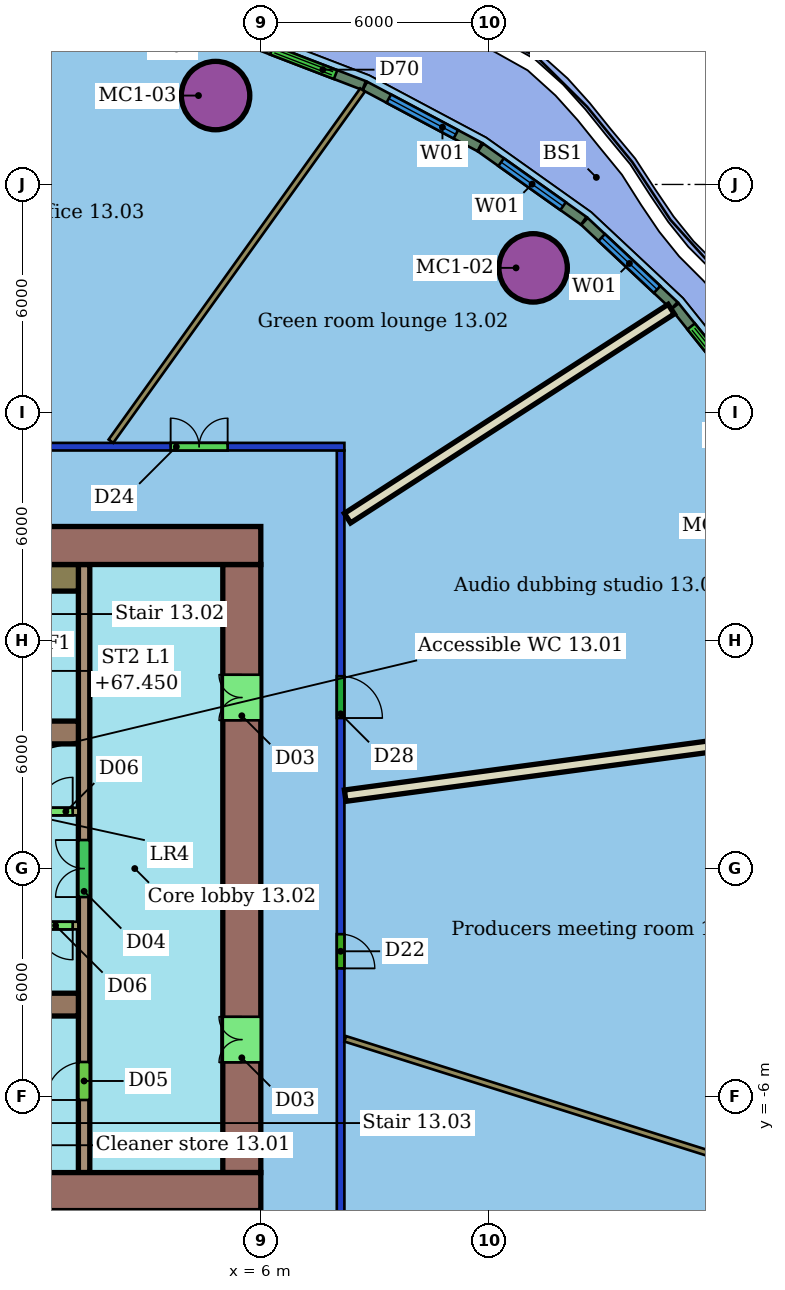
"""IFC4 building model, lengths in metres.
Left out: names, types, materials, properties, quantities, classifications, styles, units other than length and angle.
Written with IfcOpenShell. Run it as: python <this file> out.ifc"""

import sys

from ifc_helpers import new_model, si_unit, direction, frame, frame_2d, origin, origin_2d, place, context, subcontext, project, spatial, rectangle, hollow_circle, extrude, element, fill, save


model = new_model("IFC4")
c1 = context("Model", 3, precision=1e-05, world=origin(), true_north=direction((0.0, 1.0)))
c2 = subcontext(c1, "Body", "Model", "MODEL_VIEW")
j1 = project(units=[si_unit("LENGTHUNIT", "METRE"), si_unit("PLANEANGLEUNIT", "RADIAN")], contexts=[c1])
p1 = place(None, origin())
s1 = spatial("IfcSite", under=j1, at=p1, CompositionType="ELEMENT")
p2 = place(p1, origin())
s2 = spatial("IfcBuilding", under=s1, at=p2, CompositionType="ELEMENT")
p3 = place(p2, frame((0.0, 0.0, 65.6)))
s3 = spatial("IfcBuildingStorey", under=s2, at=p3, CompositionType="ELEMENT", Elevation=65.6)
for number, where, z_axis, x_axis in (
    (1, (13.166, 15.805, 0.0), (0.0, 0.0, 1.0), (1.0, 0.0, 0.0)),
    (2, (4.81, 20.339, 0.0), (0.0, 0.0, 1.0), (1.0, 0.0, 0.0)),
):
    element("IfcColumn", number, at=place(p3, frame(where, z_axis=z_axis, x_axis=x_axis)), inside=s3, PredefinedType="COLUMN", context=c2, shape_type="SweptSolid", body=[
        extrude(hollow_circle(Radius=0.9, WallThickness=0.06, at=origin_2d()), origin(), (0.0, 0.0, 1.0), 3.55),
    ])
p4 = place(p3, frame((-20.2, 11.1, 0.0), z_axis=(0.0, 0.0, 1.0), x_axis=(1.0, 0.0, 0.0)))
e3 = element("IfcWall", 3, at=p4, inside=s3, PredefinedType="PARTITIONING", context=c2, shape_type="SweptSolid", body=[
    extrude(rectangle(XDim=28.4, YDim=0.2, at=frame_2d((14.2, 0.0))), origin(), (0.0, 0.0, 1.0), 2.85),
])
p5 = place(p4, frame((23.828, 0.0, 0.0)))
e4 = element("IfcOpeningElement", 4, at=p5, cuts=e3, PredefinedType="OPENING", context=c2, shape_type="SweptSolid", body=[
    extrude(rectangle(XDim=1.5, YDim=2.1, at=frame_2d((0.75, 1.05))), frame((0.0, 0.11, 0.0), z_axis=(0.0, -1.0, 0.0), x_axis=(1.0, 0.0, 0.0)), (0.0, 0.0, 1.0), 0.22),
])
p6 = place(p4, frame((19.006, 0.0, 0.0)))
e5 = element("IfcOpeningElement", 5, at=p6, cuts=e3, PredefinedType="OPENING", context=c2, shape_type="SweptSolid", body=[
    extrude(rectangle(XDim=1.0, YDim=2.1, at=frame_2d((0.5, 1.05))), frame((0.0, 0.11, 0.0), z_axis=(0.0, -1.0, 0.0), x_axis=(1.0, 0.0, 0.0)), (0.0, 0.0, 1.0), 0.22),
])
p7 = place(p4, frame((10.323, 0.0, 0.0)))
e6 = element("IfcOpeningElement", 6, at=p7, cuts=e3, PredefinedType="OPENING", context=c2, shape_type="SweptSolid", body=[
    extrude(rectangle(XDim=1.2, YDim=2.1, at=frame_2d((0.6, 1.05))), frame((0.0, 0.11, 0.0), z_axis=(0.0, -1.0, 0.0), x_axis=(1.0, 0.0, 0.0)), (0.0, 0.0, 1.0), 0.22),
])
p8 = place(p4, frame((6.36, 0.0, 0.0)))
e7 = element("IfcOpeningElement", 7, at=p8, cuts=e3, PredefinedType="OPENING", context=c2, shape_type="SweptSolid", body=[
    extrude(rectangle(XDim=1.0, YDim=2.1, at=frame_2d((0.5, 1.05))), frame((0.0, 0.11, 0.0), z_axis=(0.0, -1.0, 0.0), x_axis=(1.0, 0.0, 0.0)), (0.0, 0.0, 1.0), 0.22),
])
p9 = place(p3, frame((8.1, 11.0, 0.0), z_axis=(0.0, 0.0, 1.0), x_axis=(0.0, -1.0, 0.0)))
e8 = element("IfcWall", 8, at=p9, inside=s3, PredefinedType="PARTITIONING", context=c2, shape_type="SweptSolid", body=[
    extrude(rectangle(XDim=22.0, YDim=0.2, at=frame_2d((11.0, 0.0))), origin(), (0.0, 0.0, 1.0), 2.85),
])
p10 = place(p9, frame((5.939, 0.0, 0.0)))
e9 = element("IfcOpeningElement", 9, at=p10, cuts=e8, PredefinedType="OPENING", context=c2, shape_type="SweptSolid", body=[
    extrude(rectangle(XDim=1.1, YDim=2.1, at=frame_2d((0.55, 1.05))), frame((0.0, 0.11, 0.0), z_axis=(0.0, -1.0, 0.0), x_axis=(1.0, 0.0, 0.0)), (0.0, 0.0, 1.0), 0.22),
])
p11 = place(p9, frame((12.727, 0.0, 0.0)))
e10 = element("IfcOpeningElement", 10, at=p11, cuts=e8, PredefinedType="OPENING", context=c2, shape_type="SweptSolid", body=[
    extrude(rectangle(XDim=0.9, YDim=2.1, at=frame_2d((0.45, 1.05))), frame((0.0, 0.11, 0.0), z_axis=(0.0, -1.0, 0.0), x_axis=(1.0, 0.0, 0.0)), (0.0, 0.0, 1.0), 0.22),
])
p12 = place(p3, frame((22.084, 3.787, 0.0), z_axis=(0.0, 0.0, 1.0), x_axis=(-0.991028950032, -0.13364737258, 0.0)))
e11 = element("IfcWall", 11, at=p12, inside=s3, PredefinedType="PARTITIONING", context=c2, shape_type="SweptSolid", body=[
    extrude(rectangle(XDim=13.989, YDim=0.3, at=frame_2d((6.995, 0.0))), origin(), (0.0, 0.0, 1.0), 3.55),
])
p13 = place(p3, frame((16.8, 14.719, 0.0), z_axis=(0.0, 0.0, 1.0), x_axis=(-0.840135613628, -0.542376392106, 0.0)))
e12 = element("IfcWall", 12, at=p13, inside=s3, PredefinedType="PARTITIONING", context=c2, shape_type="SweptSolid", body=[
    extrude(rectangle(XDim=10.139, YDim=0.3, at=frame_2d((5.07, 0.0))), origin(), (0.0, 0.0, 1.0), 3.55),
])
p14 = place(p3, frame((8.678, 20.485, 0.0), z_axis=(0.0, 0.0, 1.0), x_axis=(-0.582440193454, -0.812873557849, 0.0)))
e13 = element("IfcWall", 13, at=p14, inside=s3, PredefinedType="PARTITIONING", context=c2, shape_type="SweptSolid", body=[
    extrude(rectangle(XDim=11.368, YDim=0.15, at=frame_2d((5.684, 0.0))), origin(), (0.0, 0.0, 1.0), 3.55),
])
p15 = place(p3, frame((19.884, -8.154, 0.0), z_axis=(0.0, 0.0, 1.0), x_axis=(-0.953792780191, 0.300465193417, 0.0)))
e14 = element("IfcWall", 14, at=p15, inside=s3, PredefinedType="PARTITIONING", context=c2, shape_type="SweptSolid", body=[
    extrude(rectangle(XDim=12.226, YDim=0.15, at=frame_2d((6.113, 0.0))), origin(), (0.0, 0.0, 1.0), 3.55),
])
p16 = place(p3, frame((18.874, 12.331, 0.0), z_axis=(0.0, 0.0, 1.0), x_axis=(-0.625543346061, 0.780189414308, 0.0)))
e15 = element("IfcWall", 15, at=p16, inside=s3, PredefinedType="SOLIDWALL", context=c2, shape_type="SweptSolid", body=[
    extrude(rectangle(XDim=3.157, YDim=0.25, at=frame_2d((1.579, 0.0))), origin(), (0.0, 0.0, 1.0), 3.15),
])
p17 = place(p16, frame((0.679, 0.0, 0.0)))
e16 = element("IfcOpeningElement", 16, at=p17, cuts=e15, PredefinedType="OPENING", context=c2, shape_type="SweptSolid", body=[
    extrude(rectangle(XDim=1.8, YDim=2.4, at=frame_2d((0.9, 1.2))), frame((0.0, 0.135, 0.0), z_axis=(0.0, -1.0, 0.0), x_axis=(1.0, 0.0, 0.0)), (0.0, 0.0, 1.0), 0.27),
])
p18 = place(p3, frame((16.882, 14.813, 0.0), z_axis=(0.0, 0.0, 1.0), x_axis=(-0.729856637525, 0.68360024039, 0.0)))
e17 = element("IfcWall", 17, at=p18, inside=s3, PredefinedType="SOLIDWALL", context=c2, shape_type="SweptSolid", body=[
    extrude(rectangle(XDim=3.241, YDim=0.25, at=frame_2d((1.62, 0.0))), origin(), (0.0, 0.0, 1.0), 3.15),
])
p19 = place(p18, frame((0.62, 0.0, 0.8)))
e18 = element("IfcOpeningElement", 18, at=p19, cuts=e17, PredefinedType="OPENING", context=c2, shape_type="SweptSolid", body=[
    extrude(rectangle(XDim=2.0, YDim=2.2, at=frame_2d((1.0, 1.1))), frame((0.0, 0.135, 0.0), z_axis=(0.0, -1.0, 0.0), x_axis=(1.0, 0.0, 0.0)), (0.0, 0.0, 1.0), 0.27),
])
p20 = place(p3, frame((14.497, 17.044, 0.0), z_axis=(0.0, 0.0, 1.0), x_axis=(-0.815374335275, 0.578934101064, 0.0)))
e19 = element("IfcWall", 19, at=p20, inside=s3, PredefinedType="SOLIDWALL", context=c2, shape_type="SweptSolid", body=[
    extrude(rectangle(XDim=3.331, YDim=0.25, at=frame_2d((1.666, 0.0))), origin(), (0.0, 0.0, 1.0), 3.15),
])
p21 = place(p20, frame((0.666, 0.0, 0.8)))
e20 = element("IfcOpeningElement", 20, at=p21, cuts=e19, PredefinedType="OPENING", context=c2, shape_type="SweptSolid", body=[
    extrude(rectangle(XDim=2.0, YDim=2.2, at=frame_2d((1.0, 1.1))), frame((0.0, 0.135, 0.0), z_axis=(0.0, -1.0, 0.0), x_axis=(1.0, 0.0, 0.0)), (0.0, 0.0, 1.0), 0.27),
])
p22 = place(p3, frame((11.761, 18.985, 0.0), z_axis=(0.0, 0.0, 1.0), x_axis=(-0.882781118704, 0.469784521308, 0.0)))
e21 = element("IfcWall", 21, at=p22, inside=s3, PredefinedType="SOLIDWALL", context=c2, shape_type="SweptSolid", body=[
    extrude(rectangle(XDim=3.422, YDim=0.25, at=frame_2d((1.711, 0.0))), origin(), (0.0, 0.0, 1.0), 3.15),
])
p23 = place(p22, frame((0.711, 0.0, 0.8)))
e22 = element("IfcOpeningElement", 22, at=p23, cuts=e21, PredefinedType="OPENING", context=c2, shape_type="SweptSolid", body=[
    extrude(rectangle(XDim=2.0, YDim=2.2, at=frame_2d((1.0, 1.1))), frame((0.0, 0.135, 0.0), z_axis=(0.0, -1.0, 0.0), x_axis=(1.0, 0.0, 0.0)), (0.0, 0.0, 1.0), 0.27),
])
p24 = place(p3, frame((8.719, 20.603, 0.0), z_axis=(0.0, 0.0, 1.0), x_axis=(-0.933440649203, 0.358731869808, 0.0)))
e23 = element("IfcWall", 23, at=p24, inside=s3, PredefinedType="SOLIDWALL", context=c2, shape_type="SweptSolid", body=[
    extrude(rectangle(XDim=3.508, YDim=0.25, at=frame_2d((1.754, 0.0))), origin(), (0.0, 0.0, 1.0), 3.15),
])
p25 = place(p24, frame((0.804, 0.0, 0.0)))
e24 = element("IfcOpeningElement", 24, at=p25, cuts=e23, PredefinedType="OPENING", context=c2, shape_type="SweptSolid", body=[
    extrude(rectangle(XDim=1.8, YDim=2.4, at=frame_2d((0.9, 1.2))), frame((0.0, 0.135, 0.0), z_axis=(0.0, -1.0, 0.0), x_axis=(1.0, 0.0, 0.0)), (0.0, 0.0, 1.0), 0.27),
])
p26 = place(p3, frame((6.0, 8.5, 0.0), z_axis=(0.0, 0.0, 1.0), x_axis=(-1.0, 0.0, 0.0)))
e25 = element("IfcWall", 25, at=p26, inside=s3, PredefinedType="SHEAR", context=c2, shape_type="SweptSolid", body=[
    extrude(rectangle(XDim=12.0, YDim=1.0, at=frame_2d((6.0, 0.0))), origin(), (0.0, 0.0, 1.0), 3.4),
])
p27 = place(p26, frame((5.6, 0.0, 0.0)))
e26 = element("IfcOpeningElement", 26, at=p27, cuts=e25, PredefinedType="OPENING", context=c2, shape_type="SweptSolid", body=[
    extrude(rectangle(XDim=1.2, YDim=2.1, at=frame_2d((0.6, 1.05))), frame((0.0, 0.51, 0.0), z_axis=(0.0, -1.0, 0.0), x_axis=(1.0, 0.0, 0.0)), (0.0, 0.0, 1.0), 1.02),
])
p28 = place(p3, frame((-18.0, -8.5, 0.0), z_axis=(0.0, 0.0, 1.0), x_axis=(1.0, 0.0, 0.0)))
e27 = element("IfcWall", 27, at=p28, inside=s3, PredefinedType="SHEAR", context=c2, shape_type="SweptSolid", body=[
    extrude(rectangle(XDim=24.0, YDim=1.0, at=frame_2d((12.0, 0.0))), origin(), (0.0, 0.0, 1.0), 3.4),
])
p29 = place(p28, frame((6.0, 0.0, 0.0)))
e28 = element("IfcOpeningElement", 28, at=p29, cuts=e27, PredefinedType="OPENING", context=c2, shape_type="SweptSolid", body=[
    extrude(rectangle(XDim=1.2, YDim=2.1, at=frame_2d((0.6, 1.05))), frame((0.0, 0.51, 0.0), z_axis=(0.0, -1.0, 0.0), x_axis=(1.0, 0.0, 0.0)), (0.0, 0.0, 1.0), 1.02),
])
p30 = place(p3, frame((5.5, -8.0, 0.0), z_axis=(0.0, 0.0, 1.0), x_axis=(0.0, 1.0, 0.0)))
e29 = element("IfcWall", 29, at=p30, inside=s3, PredefinedType="SHEAR", context=c2, shape_type="SweptSolid", body=[
    extrude(rectangle(XDim=16.0, YDim=1.0, at=frame_2d((8.0, 0.0))), origin(), (0.0, 0.0, 1.0), 3.4),
])
p31 = place(p30, frame((2.9, 0.0, 0.0)))
e30 = element("IfcOpeningElement", 30, at=p31, cuts=e29, PredefinedType="OPENING", context=c2, shape_type="SweptSolid", body=[
    extrude(rectangle(XDim=1.2, YDim=2.1, at=frame_2d((0.6, 1.05))), frame((0.0, 0.51, 0.0), z_axis=(0.0, -1.0, 0.0), x_axis=(1.0, 0.0, 0.0)), (0.0, 0.0, 1.0), 1.02),
])
p32 = place(p30, frame((11.9, 0.0, 0.0)))
e31 = element("IfcOpeningElement", 31, at=p32, cuts=e29, PredefinedType="OPENING", context=c2, shape_type="SweptSolid", body=[
    extrude(rectangle(XDim=1.2, YDim=2.1, at=frame_2d((0.6, 1.05))), frame((0.0, 0.51, 0.0), z_axis=(0.0, -1.0, 0.0), x_axis=(1.0, 0.0, 0.0)), (0.0, 0.0, 1.0), 1.02),
])
for number, where, z_axis, x_axis in (
    (32, (-6.0, 3.58, 0.0), (0.0, 0.0, 1.0), (1.0, 0.0, 0.0)),
    (33, (-6.0, -3.58, 0.0), (0.0, 0.0, 1.0), (1.0, 0.0, 0.0)),
):
    element("IfcWall", number, at=place(p3, frame(where, z_axis=z_axis, x_axis=x_axis)), inside=s3, PredefinedType="SHEAR", context=c2, shape_type="SweptSolid", body=[
        extrude(rectangle(XDim=7.2, YDim=0.6, at=frame_2d((3.6, 0.0))), origin(), (0.0, 0.0, 1.0), 3.4),
    ])
p33 = place(p3, frame((1.35, -8.0, 0.0), z_axis=(0.0, 0.0, 1.0), x_axis=(0.0, 1.0, 0.0)))
e34 = element("IfcWall", 34, at=p33, inside=s3, PredefinedType="SHEAR", context=c2, shape_type="SweptSolid", body=[
    extrude(rectangle(XDim=16.0, YDim=0.3, at=frame_2d((8.0, 0.0))), origin(), (0.0, 0.0, 1.0), 3.4),
])
p34 = place(p33, frame((1.91, 0.0, 0.0)))
e35 = element("IfcOpeningElement", 35, at=p34, cuts=e34, PredefinedType="OPENING", context=c2, shape_type="SweptSolid", body=[
    extrude(rectangle(XDim=1.0, YDim=2.1, at=frame_2d((0.5, 1.05))), frame((0.0, 0.16, 0.0), z_axis=(0.0, -1.0, 0.0), x_axis=(1.0, 0.0, 0.0)), (0.0, 0.0, 1.0), 0.32),
])
p35 = place(p33, frame((7.25, 0.0, 0.0)))
e36 = element("IfcOpeningElement", 36, at=p35, cuts=e34, PredefinedType="OPENING", context=c2, shape_type="SweptSolid", body=[
    extrude(rectangle(XDim=1.5, YDim=2.1, at=frame_2d((0.75, 1.05))), frame((0.0, 0.16, 0.0), z_axis=(0.0, -1.0, 0.0), x_axis=(1.0, 0.0, 0.0)), (0.0, 0.0, 1.0), 0.32),
])
p36 = place(p3, frame((-13.2, 1.5, 0.0), z_axis=(0.0, 0.0, 1.0), x_axis=(1.0, 0.0, 0.0)))
e37 = element("IfcWall", 37, at=p36, inside=s3, PredefinedType="SHEAR", context=c2, shape_type="SweptSolid", body=[
    extrude(rectangle(XDim=14.4, YDim=0.2, at=frame_2d((7.2, 0.0))), origin(), (0.0, 0.0, 1.0), 3.4),
])
p37 = place(p36, frame((0.546, 0.0, 0.0)))
e38 = element("IfcOpeningElement", 38, at=p37, cuts=e37, PredefinedType="OPENING", context=c2, shape_type="SweptSolid", body=[
    extrude(rectangle(XDim=1.1, YDim=2.1, at=frame_2d((0.55, 1.05))), frame((0.0, 0.11, 0.0), z_axis=(0.0, -1.0, 0.0), x_axis=(1.0, 0.0, 0.0)), (0.0, 0.0, 1.0), 0.22),
])
p38 = place(p36, frame((2.988, 0.0, 0.0)))
e39 = element("IfcOpeningElement", 39, at=p38, cuts=e37, PredefinedType="OPENING", context=c2, shape_type="SweptSolid", body=[
    extrude(rectangle(XDim=1.1, YDim=2.1, at=frame_2d((0.55, 1.05))), frame((0.0, 0.11, 0.0), z_axis=(0.0, -1.0, 0.0), x_axis=(1.0, 0.0, 0.0)), (0.0, 0.0, 1.0), 0.22),
])
p39 = place(p36, frame((5.429, 0.0, 0.0)))
e40 = element("IfcOpeningElement", 40, at=p39, cuts=e37, PredefinedType="OPENING", context=c2, shape_type="SweptSolid", body=[
    extrude(rectangle(XDim=1.1, YDim=2.1, at=frame_2d((0.55, 1.05))), frame((0.0, 0.11, 0.0), z_axis=(0.0, -1.0, 0.0), x_axis=(1.0, 0.0, 0.0)), (0.0, 0.0, 1.0), 0.22),
])
p40 = place(p36, frame((7.871, 0.0, 0.0)))
e41 = element("IfcOpeningElement", 41, at=p40, cuts=e37, PredefinedType="OPENING", context=c2, shape_type="SweptSolid", body=[
    extrude(rectangle(XDim=1.1, YDim=2.1, at=frame_2d((0.55, 1.05))), frame((0.0, 0.11, 0.0), z_axis=(0.0, -1.0, 0.0), x_axis=(1.0, 0.0, 0.0)), (0.0, 0.0, 1.0), 0.22),
])
p41 = place(p36, frame((10.21, 0.0, 0.0)))
e42 = element("IfcOpeningElement", 42, at=p41, cuts=e37, PredefinedType="OPENING", context=c2, shape_type="SweptSolid", body=[
    extrude(rectangle(XDim=1.0, YDim=2.1, at=frame_2d((0.5, 1.05))), frame((0.0, 0.11, 0.0), z_axis=(0.0, -1.0, 0.0), x_axis=(1.0, 0.0, 0.0)), (0.0, 0.0, 1.0), 0.22),
])
p42 = place(p36, frame((13.35, 0.0, 0.0)))
e43 = element("IfcOpeningElement", 43, at=p42, cuts=e37, PredefinedType="OPENING", context=c2, shape_type="SweptSolid", body=[
    extrude(rectangle(XDim=0.9, YDim=2.1, at=frame_2d((0.45, 1.05))), frame((0.0, 0.11, 0.0), z_axis=(0.0, -1.0, 0.0), x_axis=(1.0, 0.0, 0.0)), (0.0, 0.0, 1.0), 0.22),
])
p43 = place(p3, frame((1.2, -1.5, 0.0), z_axis=(0.0, 0.0, 1.0), x_axis=(-1.0, 0.0, 0.0)))
e44 = element("IfcWall", 44, at=p43, inside=s3, PredefinedType="SHEAR", context=c2, shape_type="SweptSolid", body=[
    extrude(rectangle(XDim=14.4, YDim=0.2, at=frame_2d((7.2, 0.0))), origin(), (0.0, 0.0, 1.0), 3.4),
])
p44 = place(p43, frame((7.821, 0.0, 0.0)))
e45 = element("IfcOpeningElement", 45, at=p44, cuts=e44, PredefinedType="OPENING", context=c2, shape_type="SweptSolid", body=[
    extrude(rectangle(XDim=1.2, YDim=2.1, at=frame_2d((0.6, 1.05))), frame((0.0, 0.11, 0.0), z_axis=(0.0, -1.0, 0.0), x_axis=(1.0, 0.0, 0.0)), (0.0, 0.0, 1.0), 0.22),
])
p45 = place(p43, frame((0.15, 0.0, 0.0)))
e46 = element("IfcOpeningElement", 46, at=p45, cuts=e44, PredefinedType="OPENING", context=c2, shape_type="SweptSolid", body=[
    extrude(rectangle(XDim=0.9, YDim=2.1, at=frame_2d((0.45, 1.05))), frame((0.0, 0.11, 0.0), z_axis=(0.0, -1.0, 0.0), x_axis=(1.0, 0.0, 0.0)), (0.0, 0.0, 1.0), 0.22),
])
p46 = place(p3, frame((0.4, 7.65, 0.0), z_axis=(0.0, 0.0, 1.0), x_axis=(1.0, 0.0, 0.0)))
e47 = element("IfcWall", 47, at=p46, inside=s3, PredefinedType="SHEAR", context=c2, shape_type="SweptSolid", body=[
    extrude(rectangle(XDim=0.8, YDim=0.7, at=frame_2d((0.4, 0.0))), origin(), (0.0, 0.0, 1.0), 3.4),
])
p47 = place(p10, origin())
e48 = element("IfcDoor", 48, at=p47, inside=s3, OperationType="SINGLE_SWING_RIGHT", PredefinedType="DOOR", context=c2, shape_type="SweptSolid", body=[
    extrude(rectangle(XDim=1.1, YDim=2.1, at=frame_2d((0.55, 1.05))), frame((0.0, 0.025, 0.0), z_axis=(0.0, -1.0, 0.0), x_axis=(1.0, 0.0, 0.0)), (0.0, 0.0, 1.0), 0.05),
])
fill(e9, e48)
p48 = place(p5, origin())
e49 = element("IfcDoor", 49, at=p48, inside=s3, OperationType="DOUBLE_DOOR_SINGLE_SWING", PredefinedType="DOOR", context=c2, shape_type="SweptSolid", body=[
    extrude(rectangle(XDim=1.5, YDim=2.1, at=frame_2d((0.75, 1.05))), frame((0.0, 0.025, 0.0), z_axis=(0.0, -1.0, 0.0), x_axis=(1.0, 0.0, 0.0)), (0.0, 0.0, 1.0), 0.05),
])
fill(e4, e49)
p49 = place(p11, origin())
e50 = element("IfcDoor", 50, at=p49, inside=s3, OperationType="SINGLE_SWING_RIGHT", PredefinedType="DOOR", context=c2, shape_type="SweptSolid", body=[
    extrude(rectangle(XDim=0.9, YDim=2.1, at=frame_2d((0.45, 1.05))), frame((0.0, 0.025, 0.0), z_axis=(0.0, -1.0, 0.0), x_axis=(1.0, 0.0, 0.0)), (0.0, 0.0, 1.0), 0.05),
])
fill(e10, e50)
p50 = place(p17, origin())
e51 = element("IfcDoor", 51, at=p50, inside=s3, OperationType="DOUBLE_DOOR_SLIDING", PredefinedType="DOOR", context=c2, shape_type="SweptSolid", body=[
    extrude(rectangle(XDim=1.8, YDim=2.4, at=frame_2d((0.9, 1.2))), frame((0.0, 0.025, 0.0), z_axis=(0.0, -1.0, 0.0), x_axis=(1.0, 0.0, 0.0)), (0.0, 0.0, 1.0), 0.05),
])
fill(e16, e51)
p51 = place(p19, origin())
e52 = element("IfcWindow", 52, at=p51, inside=s3, PartitioningType="SINGLE_PANEL", PredefinedType="WINDOW", context=c2, shape_type="SweptSolid", body=[
    extrude(rectangle(XDim=2.0, YDim=2.2, at=frame_2d((1.0, 1.1))), frame((0.0, 0.03, 0.0), z_axis=(0.0, -1.0, 0.0), x_axis=(1.0, 0.0, 0.0)), (0.0, 0.0, 1.0), 0.06),
])
fill(e18, e52)
p52 = place(p21, origin())
e53 = element("IfcWindow", 53, at=p52, inside=s3, PartitioningType="SINGLE_PANEL", PredefinedType="WINDOW", context=c2, shape_type="SweptSolid", body=[
    extrude(rectangle(XDim=2.0, YDim=2.2, at=frame_2d((1.0, 1.1))), frame((0.0, 0.03, 0.0), z_axis=(0.0, -1.0, 0.0), x_axis=(1.0, 0.0, 0.0)), (0.0, 0.0, 1.0), 0.06),
])
fill(e20, e53)
p53 = place(p23, origin())
e54 = element("IfcWindow", 54, at=p53, inside=s3, PartitioningType="SINGLE_PANEL", PredefinedType="WINDOW", context=c2, shape_type="SweptSolid", body=[
    extrude(rectangle(XDim=2.0, YDim=2.2, at=frame_2d((1.0, 1.1))), frame((0.0, 0.03, 0.0), z_axis=(0.0, -1.0, 0.0), x_axis=(1.0, 0.0, 0.0)), (0.0, 0.0, 1.0), 0.06),
])
fill(e22, e54)
p54 = place(p25, origin())
e55 = element("IfcDoor", 55, at=p54, inside=s3, OperationType="DOUBLE_DOOR_SLIDING", PredefinedType="DOOR", context=c2, shape_type="SweptSolid", body=[
    extrude(rectangle(XDim=1.8, YDim=2.4, at=frame_2d((0.9, 1.2))), frame((0.0, 0.025, 0.0), z_axis=(0.0, -1.0, 0.0), x_axis=(1.0, 0.0, 0.0)), (0.0, 0.0, 1.0), 0.05),
])
fill(e24, e55)
p55 = place(p31, origin())
e56 = element("IfcDoor", 56, at=p55, inside=s3, OperationType="DOUBLE_DOOR_SINGLE_SWING", PredefinedType="NOTDEFINED", context=c2, shape_type="SweptSolid", body=[
    extrude(rectangle(XDim=1.2, YDim=2.1, at=frame_2d((0.6, 1.05))), frame((0.0, 0.025, 0.0), z_axis=(0.0, -1.0, 0.0), x_axis=(1.0, 0.0, 0.0)), (0.0, 0.0, 1.0), 0.05),
])
fill(e30, e56)
p56 = place(p32, origin())
e57 = element("IfcDoor", 57, at=p56, inside=s3, OperationType="DOUBLE_DOOR_SINGLE_SWING", PredefinedType="NOTDEFINED", context=c2, shape_type="SweptSolid", body=[
    extrude(rectangle(XDim=1.2, YDim=2.1, at=frame_2d((0.6, 1.05))), frame((0.0, 0.025, 0.0), z_axis=(0.0, -1.0, 0.0), x_axis=(1.0, 0.0, 0.0)), (0.0, 0.0, 1.0), 0.05),
])
fill(e31, e57)
p57 = place(p34, origin())
e58 = element("IfcDoor", 58, at=p57, inside=s3, OperationType="SINGLE_SWING_LEFT", PredefinedType="NOTDEFINED", context=c2, shape_type="SweptSolid", body=[
    extrude(rectangle(XDim=1.0, YDim=2.1, at=frame_2d((0.5, 1.05))), frame((0.0, 0.025, 0.0), z_axis=(0.0, -1.0, 0.0), x_axis=(1.0, 0.0, 0.0)), (0.0, 0.0, 1.0), 0.05),
])
fill(e35, e58)
p58 = place(p35, origin())
e59 = element("IfcDoor", 59, at=p58, inside=s3, OperationType="DOUBLE_DOOR_SINGLE_SWING", PredefinedType="NOTDEFINED", context=c2, shape_type="SweptSolid", body=[
    extrude(rectangle(XDim=1.5, YDim=2.1, at=frame_2d((0.75, 1.05))), frame((0.0, 0.025, 0.0), z_axis=(0.0, -1.0, 0.0), x_axis=(1.0, 0.0, 0.0)), (0.0, 0.0, 1.0), 0.05),
])
fill(e36, e59)
p59 = place(p42, origin())
e60 = element("IfcDoor", 60, at=p59, inside=s3, OperationType="SINGLE_SWING_RIGHT", PredefinedType="NOTDEFINED", context=c2, shape_type="SweptSolid", body=[
    extrude(rectangle(XDim=0.9, YDim=2.1, at=frame_2d((0.45, 1.05))), frame((0.0, 0.025, 0.0), z_axis=(0.0, -1.0, 0.0), x_axis=(1.0, 0.0, 0.0)), (0.0, 0.0, 1.0), 0.05),
])
fill(e43, e60)
p60 = place(p45, origin())
e61 = element("IfcDoor", 61, at=p60, inside=s3, OperationType="SINGLE_SWING_LEFT", PredefinedType="NOTDEFINED", context=c2, shape_type="SweptSolid", body=[
    extrude(rectangle(XDim=0.9, YDim=2.1, at=frame_2d((0.45, 1.05))), frame((0.0, 0.025, 0.0), z_axis=(0.0, -1.0, 0.0), x_axis=(1.0, 0.0, 0.0)), (0.0, 0.0, 1.0), 0.05),
])
fill(e46, e61)
save(model, sys.argv[1])
